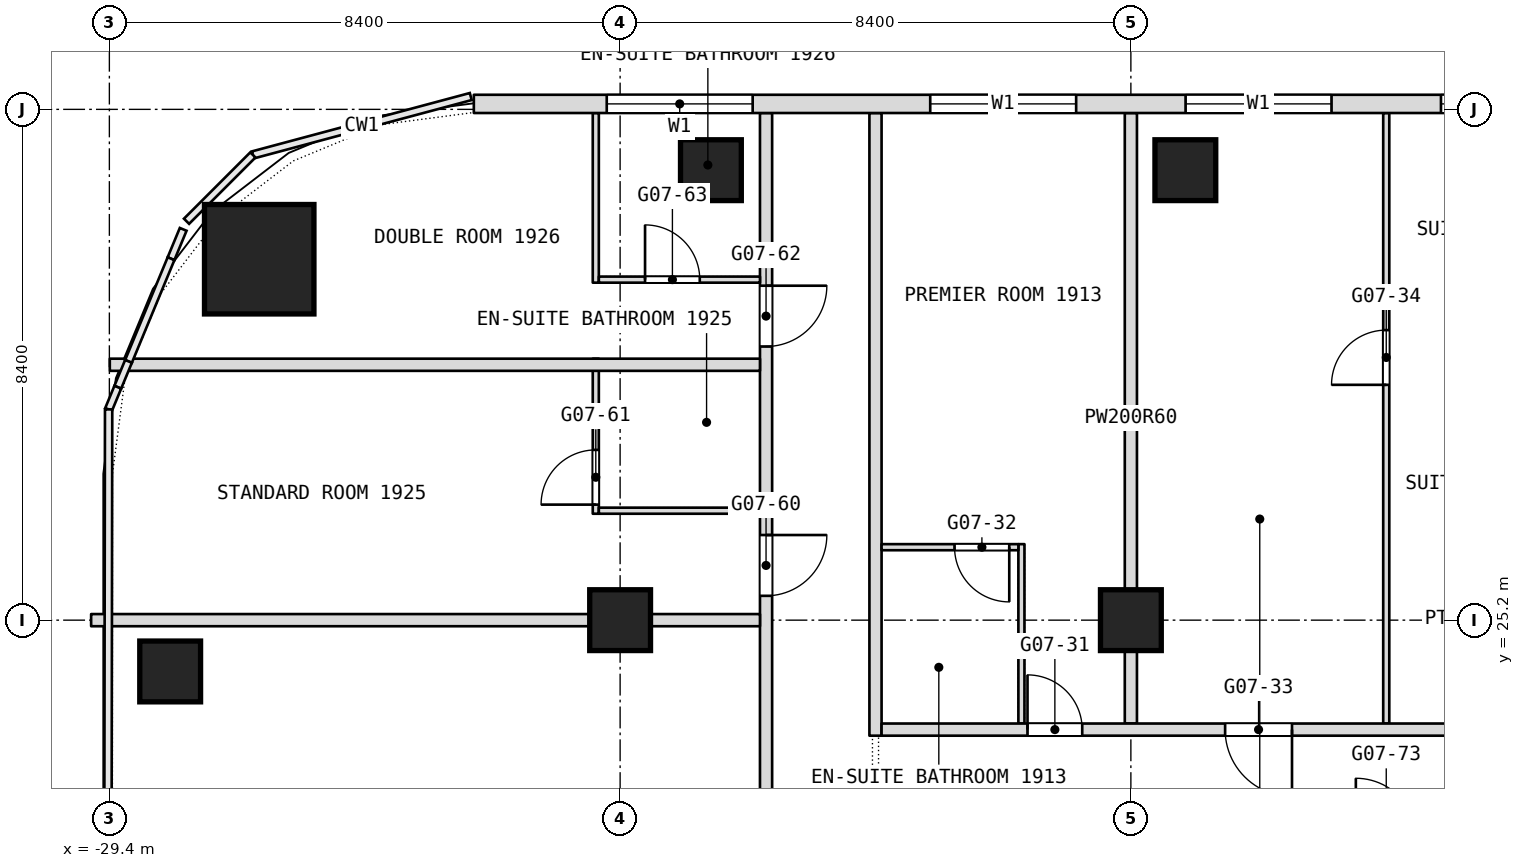
"""IFC4 building model, lengths in metres.
Left out: names, types, materials, properties, quantities, classifications, styles, units other than length and angle.
Written with IfcOpenShell. Run it as: python <this file> out.ifc"""

import sys

from ifc_helpers import new_model, si_unit, direction, frame, frame_2d, origin, origin_2d, place, context, subcontext, project, spatial, rectangle, extrude, element, fill, save


model = new_model("IFC4")
c1 = context("Model", 3, precision=1e-05, world=origin(), true_north=direction((0.0, 1.0)))
c2 = subcontext(c1, "Body", "Model", "MODEL_VIEW")
j1 = project(units=[si_unit("LENGTHUNIT", "METRE"), si_unit("PLANEANGLEUNIT", "RADIAN")], contexts=[c1])
p1 = place(None, origin())
s1 = spatial("IfcSite", under=j1, at=p1, CompositionType="ELEMENT")
p2 = place(p1, origin())
s2 = spatial("IfcBuilding", under=s1, at=p2, CompositionType="ELEMENT")
p3 = place(p2, frame((0.0, 0.0, 83.3)))
s3 = spatial("IfcBuildingStorey", under=s2, at=p3, CompositionType="ELEMENT", Elevation=83.3)
p4 = place(p3, frame((-26.936, 31.135, 0.0), z_axis=(0.0, 0.0, 1.0), x_axis=(1.0, 0.0, 0.0)))
e1 = element("IfcColumn", 1, at=p4, inside=s3, PredefinedType="COLUMN", context=c2, shape_type="SweptSolid", body=[
    extrude(rectangle(XDim=1.8, YDim=1.8, at=origin_2d()), origin(), (0.0, 0.0, 1.0), 3.6),
])
for number, where, z_axis, x_axis in (
    (2, (-21.0, 25.2, 0.0), (0.0, 0.0, 1.0), (1.0, 0.0, 0.0)),
    (3, (-12.6, 25.2, 0.0), (0.0, 0.0, 1.0), (1.0, 0.0, 0.0)),
    (4, (-28.4, 24.356, 0.0), (0.0, 0.0, 1.0), (1.0, 0.0, 0.0)),
    (5, (-19.507, 32.6, 0.0), (0.0, 0.0, 1.0), (1.0, 0.0, 0.0)),
    (6, (-11.704, 32.6, 0.0), (0.0, 0.0, 1.0), (1.0, 0.0, 0.0)),
):
    element("IfcColumn", number, at=place(p3, frame(where, z_axis=z_axis, x_axis=x_axis)), inside=s3, PredefinedType="COLUMN", context=c2, shape_type="SweptSolid", body=[
        extrude(rectangle(XDim=1.0, YDim=1.0, at=origin_2d()), origin(), (0.0, 0.0, 1.0), 3.6),
    ])
p5 = place(p3, frame((-8.4, 23.5, 0.0), z_axis=(0.0, 0.0, 1.0), x_axis=(0.0, 1.0, 0.0)))
e7 = element("IfcWall", 7, at=p5, inside=s3, PredefinedType="PARTITIONING", context=c2, shape_type="SweptSolid", body=[
    extrude(rectangle(XDim=10.04, YDim=0.1, at=frame_2d((5.02, 0.0))), origin(), (0.0, 0.0, 1.0), 3.3),
])
p6 = place(p5, frame((5.57, 0.0, 0.0)))
e8 = element("IfcOpeningElement", 8, at=p6, cuts=e7, PredefinedType="OPENING", context=c2, shape_type="SweptSolid", body=[
    extrude(rectangle(XDim=0.9, YDim=2.1, at=frame_2d((0.45, 1.05))), frame((0.0, 0.05, 0.0), z_axis=(0.0, -1.0, 0.0), x_axis=(1.0, 0.0, 0.0)), (0.0, 0.0, 1.0), 0.1),
])
p7 = place(p3, frame((-12.6, 23.5, 0.0), z_axis=(0.0, 0.0, 1.0), x_axis=(0.0, 1.0, 0.0)))
e9 = element("IfcWall", 9, at=p7, inside=s3, PredefinedType="PARTITIONING", context=c2, shape_type="SweptSolid", body=[
    extrude(rectangle(XDim=10.04, YDim=0.2, at=frame_2d((5.02, 0.0))), origin(), (0.0, 0.0, 1.0), 3.3),
])
p8 = place(p3, frame((-14.4, 23.5, 0.0), z_axis=(0.0, 0.0, 1.0), x_axis=(0.0, 1.0, 0.0)))
e10 = element("IfcWall", 10, at=p8, inside=s3, PredefinedType="PARTITIONING", context=c2, shape_type="SweptSolid", body=[
    extrude(rectangle(XDim=2.95, YDim=0.1, at=frame_2d((1.475, 0.0))), origin(), (0.0, 0.0, 1.0), 3.3),
])
p9 = place(p3, frame((-16.8, 23.3, 0.0), z_axis=(0.0, 0.0, 1.0), x_axis=(0.0, 1.0, 0.0)))
e11 = element("IfcWall", 11, at=p9, inside=s3, PredefinedType="PARTITIONING", context=c2, shape_type="SweptSolid", body=[
    extrude(rectangle(XDim=10.24, YDim=0.2, at=frame_2d((5.12, 0.0))), origin(), (0.0, 0.0, 1.0), 3.3),
])
p10 = place(p3, frame((-18.6, 18.5, 0.0), z_axis=(0.0, 0.0, 1.0), x_axis=(0.0, 1.0, 0.0)))
e12 = element("IfcWall", 12, at=p10, inside=s3, PredefinedType="PARTITIONING", context=c2, shape_type="SweptSolid", body=[
    extrude(rectangle(XDim=15.04, YDim=0.2, at=frame_2d((7.52, 0.0))), origin(), (0.0, 0.0, 1.0), 3.3),
])
p11 = place(p10, frame((1.6, 0.0, 0.0)))
e13 = element("IfcOpeningElement", 13, at=p11, cuts=e12, PredefinedType="OPENING", context=c2, shape_type="SweptSolid", body=[
    extrude(rectangle(XDim=1.8, YDim=2.1, at=frame_2d((0.9, 1.05))), frame((0.0, 0.1, 0.0), z_axis=(0.0, -1.0, 0.0), x_axis=(1.0, 0.0, 0.0)), (0.0, 0.0, 1.0), 0.2),
])
p12 = place(p10, frame((7.1, 0.0, 0.0)))
e14 = element("IfcOpeningElement", 14, at=p12, cuts=e12, PredefinedType="OPENING", context=c2, shape_type="SweptSolid", body=[
    extrude(rectangle(XDim=1.0, YDim=2.1, at=frame_2d((0.5, 1.05))), frame((0.0, 0.1, 0.0), z_axis=(0.0, -1.0, 0.0), x_axis=(1.0, 0.0, 0.0)), (0.0, 0.0, 1.0), 0.2),
])
p13 = place(p10, frame((11.2, 0.0, 0.0)))
e15 = element("IfcOpeningElement", 15, at=p13, cuts=e12, PredefinedType="OPENING", context=c2, shape_type="SweptSolid", body=[
    extrude(rectangle(XDim=1.0, YDim=2.1, at=frame_2d((0.5, 1.05))), frame((0.0, 0.1, 0.0), z_axis=(0.0, -1.0, 0.0), x_axis=(1.0, 0.0, 0.0)), (0.0, 0.0, 1.0), 0.2),
])
p14 = place(p3, frame((-21.4, 26.95, 0.0), z_axis=(0.0, 0.0, 1.0), x_axis=(0.0, 1.0, 0.0)))
e16 = element("IfcWall", 16, at=p14, inside=s3, PredefinedType="PARTITIONING", context=c2, shape_type="SweptSolid", body=[
    extrude(rectangle(XDim=2.55, YDim=0.1, at=frame_2d((1.275, 0.0))), origin(), (0.0, 0.0, 1.0), 3.3),
])
p15 = place(p14, frame((0.15, 0.0, 0.0)))
e17 = element("IfcOpeningElement", 17, at=p15, cuts=e16, PredefinedType="OPENING", context=c2, shape_type="SweptSolid", body=[
    extrude(rectangle(XDim=0.9, YDim=2.1, at=frame_2d((0.45, 1.05))), frame((0.0, 0.05, 0.0), z_axis=(0.0, -1.0, 0.0), x_axis=(1.0, 0.0, 0.0)), (0.0, 0.0, 1.0), 0.1),
])
p16 = place(p3, frame((-21.4, 30.75, 0.0), z_axis=(0.0, 0.0, 1.0), x_axis=(0.0, 1.0, 0.0)))
e18 = element("IfcWall", 18, at=p16, inside=s3, PredefinedType="PARTITIONING", context=c2, shape_type="SweptSolid", body=[
    extrude(rectangle(XDim=2.79, YDim=0.1, at=frame_2d((1.395, 0.0))), origin(), (0.0, 0.0, 1.0), 3.3),
])
p17 = place(p3, frame((-16.7, 23.4, 0.0), z_axis=(0.0, 0.0, 1.0), x_axis=(1.0, 0.0, 0.0)))
e19 = element("IfcWall", 19, at=p17, inside=s3, PredefinedType="PARTITIONING", context=c2, shape_type="SweptSolid", body=[
    extrude(rectangle(XDim=23.4, YDim=0.2, at=frame_2d((11.7, 0.0))), origin(), (0.0, 0.0, 1.0), 3.3),
])
p18 = place(p17, frame((2.4, 0.0, 0.0)))
e20 = element("IfcOpeningElement", 20, at=p18, cuts=e19, PredefinedType="OPENING", context=c2, shape_type="SweptSolid", body=[
    extrude(rectangle(XDim=0.9, YDim=2.1, at=frame_2d((0.45, 1.05))), frame((0.0, 0.1, 0.0), z_axis=(0.0, -1.0, 0.0), x_axis=(1.0, 0.0, 0.0)), (0.0, 0.0, 1.0), 0.2),
])
p19 = place(p17, frame((5.65, 0.0, 0.0)))
e21 = element("IfcOpeningElement", 21, at=p19, cuts=e19, PredefinedType="OPENING", context=c2, shape_type="SweptSolid", body=[
    extrude(rectangle(XDim=1.1, YDim=2.1, at=frame_2d((0.55, 1.05))), frame((0.0, 0.1, 0.0), z_axis=(0.0, -1.0, 0.0), x_axis=(1.0, 0.0, 0.0)), (0.0, 0.0, 1.0), 0.2),
])
p20 = place(p17, frame((15.3, 0.0, 0.0)))
e22 = element("IfcOpeningElement", 22, at=p20, cuts=e19, PredefinedType="OPENING", context=c2, shape_type="SweptSolid", body=[
    extrude(rectangle(XDim=1.0, YDim=2.1, at=frame_2d((0.5, 1.05))), frame((0.0, 0.1, 0.0), z_axis=(0.0, -1.0, 0.0), x_axis=(1.0, 0.0, 0.0)), (0.0, 0.0, 1.0), 0.2),
])
p21 = place(p17, frame((17.1, 0.0, 0.0)))
e23 = element("IfcOpeningElement", 23, at=p21, cuts=e19, PredefinedType="OPENING", context=c2, shape_type="SweptSolid", body=[
    extrude(rectangle(XDim=1.0, YDim=2.1, at=frame_2d((0.5, 1.05))), frame((0.0, 0.1, 0.0), z_axis=(0.0, -1.0, 0.0), x_axis=(1.0, 0.0, 0.0)), (0.0, 0.0, 1.0), 0.2),
])
p22 = place(p3, frame((-29.7, 25.2, 0.0), z_axis=(0.0, 0.0, 1.0), x_axis=(1.0, 0.0, 0.0)))
e24 = element("IfcWall", 24, at=p22, inside=s3, PredefinedType="PARTITIONING", context=c2, shape_type="SweptSolid", body=[
    extrude(rectangle(XDim=11.0, YDim=0.2, at=frame_2d((5.5, 0.0))), origin(), (0.0, 0.0, 1.0), 2.8),
])
p23 = place(p3, frame((-16.7, 26.4, 0.0), z_axis=(0.0, 0.0, 1.0), x_axis=(1.0, 0.0, 0.0)))
e25 = element("IfcWall", 25, at=p23, inside=s3, PredefinedType="PARTITIONING", context=c2, shape_type="SweptSolid", body=[
    extrude(rectangle(XDim=2.25, YDim=0.1, at=frame_2d((1.125, 0.0))), origin(), (0.0, 0.0, 1.0), 3.3),
])
p24 = place(p23, frame((1.2, 0.0, 0.0)))
e26 = element("IfcOpeningElement", 26, at=p24, cuts=e25, PredefinedType="OPENING", context=c2, shape_type="SweptSolid", body=[
    extrude(rectangle(XDim=0.9, YDim=2.1, at=frame_2d((0.45, 1.05))), frame((0.0, 0.05, 0.0), z_axis=(0.0, -1.0, 0.0), x_axis=(1.0, 0.0, 0.0)), (0.0, 0.0, 1.0), 0.1),
])
p25 = place(p3, frame((-21.35, 27.0, 0.0), z_axis=(0.0, 0.0, 1.0), x_axis=(1.0, 0.0, 0.0)))
e27 = element("IfcWall", 27, at=p25, inside=s3, PredefinedType="PARTITIONING", context=c2, shape_type="SweptSolid", body=[
    extrude(rectangle(XDim=2.65, YDim=0.1, at=frame_2d((1.325, 0.0))), origin(), (0.0, 0.0, 1.0), 3.3),
])
p26 = place(p3, frame((-29.393, 29.4, 0.0), z_axis=(0.0, 0.0, 1.0), x_axis=(1.0, 0.0, 0.0)))
e28 = element("IfcWall", 28, at=p26, inside=s3, PredefinedType="PARTITIONING", context=c2, shape_type="SweptSolid", body=[
    extrude(rectangle(XDim=10.693, YDim=0.2, at=frame_2d((5.347, 0.0))), origin(), (0.0, 0.0, 1.0), 3.3),
])
p27 = place(p3, frame((-21.35, 30.8, 0.0), z_axis=(0.0, 0.0, 1.0), x_axis=(1.0, 0.0, 0.0)))
e29 = element("IfcWall", 29, at=p27, inside=s3, PredefinedType="PARTITIONING", context=c2, shape_type="SweptSolid", body=[
    extrude(rectangle(XDim=2.65, YDim=0.1, at=frame_2d((1.325, 0.0))), origin(), (0.0, 0.0, 1.0), 3.3),
])
p28 = place(p27, frame((0.76, 0.0, 0.0)))
e30 = element("IfcOpeningElement", 30, at=p28, cuts=e29, PredefinedType="OPENING", context=c2, shape_type="SweptSolid", body=[
    extrude(rectangle(XDim=0.9, YDim=2.1, at=frame_2d((0.45, 1.05))), frame((0.0, 0.05, 0.0), z_axis=(0.0, -1.0, 0.0), x_axis=(1.0, 0.0, 0.0)), (0.0, 0.0, 1.0), 0.1),
])
p29 = place(p3, frame((23.406, 33.69, 0.0), z_axis=(0.0, 0.0, 1.0), x_axis=(-1.0, 0.0, 0.0)))
e31 = element("IfcWall", 31, at=p29, inside=s3, PredefinedType="NOTDEFINED", context=c2, shape_type="SweptSolid", body=[
    extrude(rectangle(XDim=46.812, YDim=0.3, at=frame_2d((23.406, 0.0))), origin(), (0.0, 0.0, 1.0), 3.6),
])
p30 = place(p29, frame((2.186, 0.0, 0.9)))
e32 = element("IfcOpeningElement", 32, at=p30, cuts=e31, PredefinedType="OPENING", context=c2, shape_type="SweptSolid", body=[
    extrude(rectangle(XDim=2.4, YDim=2.1, at=frame_2d((1.2, 1.05))), frame((0.0, 0.15, 0.0), z_axis=(0.0, -1.0, 0.0), x_axis=(1.0, 0.0, 0.0)), (0.0, 0.0, 1.0), 0.3),
])
p31 = place(p29, frame((7.506, 0.0, 0.9)))
e33 = element("IfcOpeningElement", 33, at=p31, cuts=e31, PredefinedType="OPENING", context=c2, shape_type="SweptSolid", body=[
    extrude(rectangle(XDim=2.4, YDim=2.1, at=frame_2d((1.2, 1.05))), frame((0.0, 0.15, 0.0), z_axis=(0.0, -1.0, 0.0), x_axis=(1.0, 0.0, 0.0)), (0.0, 0.0, 1.0), 0.3),
])
p32 = place(p29, frame((11.706, 0.0, 0.9)))
e34 = element("IfcOpeningElement", 34, at=p32, cuts=e31, PredefinedType="OPENING", context=c2, shape_type="SweptSolid", body=[
    extrude(rectangle(XDim=2.4, YDim=2.1, at=frame_2d((1.2, 1.05))), frame((0.0, 0.15, 0.0), z_axis=(0.0, -1.0, 0.0), x_axis=(1.0, 0.0, 0.0)), (0.0, 0.0, 1.0), 0.3),
])
p33 = place(p29, frame((15.906, 0.0, 0.9)))
e35 = element("IfcOpeningElement", 35, at=p33, cuts=e31, PredefinedType="OPENING", context=c2, shape_type="SweptSolid", body=[
    extrude(rectangle(XDim=2.4, YDim=2.1, at=frame_2d((1.2, 1.05))), frame((0.0, 0.15, 0.0), z_axis=(0.0, -1.0, 0.0), x_axis=(1.0, 0.0, 0.0)), (0.0, 0.0, 1.0), 0.3),
])
p34 = place(p29, frame((20.106, 0.0, 0.9)))
e36 = element("IfcOpeningElement", 36, at=p34, cuts=e31, PredefinedType="OPENING", context=c2, shape_type="SweptSolid", body=[
    extrude(rectangle(XDim=2.4, YDim=2.1, at=frame_2d((1.2, 1.05))), frame((0.0, 0.15, 0.0), z_axis=(0.0, -1.0, 0.0), x_axis=(1.0, 0.0, 0.0)), (0.0, 0.0, 1.0), 0.3),
])
p35 = place(p29, frame((24.306, 0.0, 0.9)))
e37 = element("IfcOpeningElement", 37, at=p35, cuts=e31, PredefinedType="OPENING", context=c2, shape_type="SweptSolid", body=[
    extrude(rectangle(XDim=2.4, YDim=2.1, at=frame_2d((1.2, 1.05))), frame((0.0, 0.15, 0.0), z_axis=(0.0, -1.0, 0.0), x_axis=(1.0, 0.0, 0.0)), (0.0, 0.0, 1.0), 0.3),
])
p36 = place(p29, frame((28.506, 0.0, 0.9)))
e38 = element("IfcOpeningElement", 38, at=p36, cuts=e31, PredefinedType="OPENING", context=c2, shape_type="SweptSolid", body=[
    extrude(rectangle(XDim=2.4, YDim=2.1, at=frame_2d((1.2, 1.05))), frame((0.0, 0.15, 0.0), z_axis=(0.0, -1.0, 0.0), x_axis=(1.0, 0.0, 0.0)), (0.0, 0.0, 1.0), 0.3),
])
p37 = place(p29, frame((32.706, 0.0, 0.9)))
e39 = element("IfcOpeningElement", 39, at=p37, cuts=e31, PredefinedType="OPENING", context=c2, shape_type="SweptSolid", body=[
    extrude(rectangle(XDim=2.4, YDim=2.1, at=frame_2d((1.2, 1.05))), frame((0.0, 0.15, 0.0), z_axis=(0.0, -1.0, 0.0), x_axis=(1.0, 0.0, 0.0)), (0.0, 0.0, 1.0), 0.3),
])
p38 = place(p29, frame((36.906, 0.0, 0.9)))
e40 = element("IfcOpeningElement", 40, at=p38, cuts=e31, PredefinedType="OPENING", context=c2, shape_type="SweptSolid", body=[
    extrude(rectangle(XDim=2.4, YDim=2.1, at=frame_2d((1.2, 1.05))), frame((0.0, 0.15, 0.0), z_axis=(0.0, -1.0, 0.0), x_axis=(1.0, 0.0, 0.0)), (0.0, 0.0, 1.0), 0.3),
])
p39 = place(p29, frame((42.226, 0.0, 0.9)))
e41 = element("IfcOpeningElement", 41, at=p39, cuts=e31, PredefinedType="OPENING", context=c2, shape_type="SweptSolid", body=[
    extrude(rectangle(XDim=2.4, YDim=2.1, at=frame_2d((1.2, 1.05))), frame((0.0, 0.15, 0.0), z_axis=(0.0, -1.0, 0.0), x_axis=(1.0, 0.0, 0.0)), (0.0, 0.0, 1.0), 0.3),
])
p40 = place(p6, origin())
e42 = element("IfcDoor", 42, at=p40, inside=s3, OperationType="SINGLE_SWING_RIGHT", PredefinedType="DOOR", context=c2, shape_type="SweptSolid", body=[
    extrude(rectangle(XDim=0.9, YDim=2.1, at=frame_2d((0.45, 1.05))), frame((0.0, 0.025, 0.0), z_axis=(0.0, -1.0, 0.0), x_axis=(1.0, 0.0, 0.0)), (0.0, 0.0, 1.0), 0.05),
])
fill(e8, e42)
p41 = place(p12, origin())
e43 = element("IfcDoor", 43, at=p41, inside=s3, OperationType="SINGLE_SWING_LEFT", PredefinedType="DOOR", context=c2, shape_type="SweptSolid", body=[
    extrude(rectangle(XDim=1.0, YDim=2.1, at=frame_2d((0.5, 1.05))), frame((0.0, 0.025, 0.0), z_axis=(0.0, -1.0, 0.0), x_axis=(1.0, 0.0, 0.0)), (0.0, 0.0, 1.0), 0.05),
])
fill(e14, e43)
p42 = place(p13, origin())
e44 = element("IfcDoor", 44, at=p42, inside=s3, OperationType="SINGLE_SWING_RIGHT", PredefinedType="DOOR", context=c2, shape_type="SweptSolid", body=[
    extrude(rectangle(XDim=1.0, YDim=2.1, at=frame_2d((0.5, 1.05))), frame((0.0, 0.025, 0.0), z_axis=(0.0, -1.0, 0.0), x_axis=(1.0, 0.0, 0.0)), (0.0, 0.0, 1.0), 0.05),
])
fill(e15, e44)
p43 = place(p15, origin())
e45 = element("IfcDoor", 45, at=p43, inside=s3, OperationType="SINGLE_SWING_RIGHT", PredefinedType="DOOR", context=c2, shape_type="SweptSolid", body=[
    extrude(rectangle(XDim=0.9, YDim=2.1, at=frame_2d((0.45, 1.05))), frame((0.0, 0.025, 0.0), z_axis=(0.0, -1.0, 0.0), x_axis=(1.0, 0.0, 0.0)), (0.0, 0.0, 1.0), 0.05),
])
fill(e17, e45)
p44 = place(p18, origin())
e46 = element("IfcDoor", 46, at=p44, inside=s3, OperationType="SINGLE_SWING_LEFT", PredefinedType="DOOR", context=c2, shape_type="SweptSolid", body=[
    extrude(rectangle(XDim=0.9, YDim=2.1, at=frame_2d((0.45, 1.05))), frame((0.0, 0.025, 0.0), z_axis=(0.0, -1.0, 0.0), x_axis=(1.0, 0.0, 0.0)), (0.0, 0.0, 1.0), 0.05),
])
fill(e20, e46)
p45 = place(p19, origin())
e47 = element("IfcDoor", 47, at=p45, inside=s3, OperationType="SINGLE_SWING_RIGHT", PredefinedType="DOOR", context=c2, shape_type="SweptSolid", body=[
    extrude(rectangle(XDim=1.1, YDim=2.1, at=frame_2d((0.55, 1.05))), frame((0.0, 0.025, 0.0), z_axis=(0.0, -1.0, 0.0), x_axis=(1.0, 0.0, 0.0)), (0.0, 0.0, 1.0), 0.05),
])
fill(e21, e47)
p46 = place(p24, origin())
e48 = element("IfcDoor", 48, at=p46, inside=s3, OperationType="SINGLE_SWING_LEFT", PredefinedType="DOOR", context=c2, shape_type="SweptSolid", body=[
    extrude(rectangle(XDim=0.9, YDim=2.1, at=frame_2d((0.45, 1.05))), frame((0.0, 0.025, 0.0), z_axis=(0.0, -1.0, 0.0), x_axis=(1.0, 0.0, 0.0)), (0.0, 0.0, 1.0), 0.05),
])
fill(e26, e48)
p47 = place(p28, origin())
e49 = element("IfcDoor", 49, at=p47, inside=s3, OperationType="SINGLE_SWING_LEFT", PredefinedType="DOOR", context=c2, shape_type="SweptSolid", body=[
    extrude(rectangle(XDim=0.9, YDim=2.1, at=frame_2d((0.45, 1.05))), frame((0.0, 0.025, 0.0), z_axis=(0.0, -1.0, 0.0), x_axis=(1.0, 0.0, 0.0)), (0.0, 0.0, 1.0), 0.05),
])
fill(e30, e49)
p48 = place(p36, origin())
e50 = element("IfcWindow", 50, at=p48, inside=s3, PartitioningType="SINGLE_PANEL", PredefinedType="WINDOW", context=c2, shape_type="SweptSolid", body=[
    extrude(rectangle(XDim=2.4, YDim=2.1, at=frame_2d((1.2, 1.05))), frame((0.0, 0.03, 0.0), z_axis=(0.0, -1.0, 0.0), x_axis=(1.0, 0.0, 0.0)), (0.0, 0.0, 1.0), 0.06),
])
fill(e38, e50)
p49 = place(p37, origin())
e51 = element("IfcWindow", 51, at=p49, inside=s3, PartitioningType="SINGLE_PANEL", PredefinedType="WINDOW", context=c2, shape_type="SweptSolid", body=[
    extrude(rectangle(XDim=2.4, YDim=2.1, at=frame_2d((1.2, 1.05))), frame((0.0, 0.03, 0.0), z_axis=(0.0, -1.0, 0.0), x_axis=(1.0, 0.0, 0.0)), (0.0, 0.0, 1.0), 0.06),
])
fill(e39, e51)
p50 = place(p38, origin())
e52 = element("IfcWindow", 52, at=p50, inside=s3, PartitioningType="SINGLE_PANEL", PredefinedType="WINDOW", context=c2, shape_type="SweptSolid", body=[
    extrude(rectangle(XDim=2.4, YDim=2.1, at=frame_2d((1.2, 1.05))), frame((0.0, 0.03, 0.0), z_axis=(0.0, -1.0, 0.0), x_axis=(1.0, 0.0, 0.0)), (0.0, 0.0, 1.0), 0.06),
])
fill(e40, e52)
p51 = place(p39, origin())
e53 = element("IfcWindow", 53, at=p51, inside=s3, PartitioningType="SINGLE_PANEL", PredefinedType="WINDOW", context=c2, shape_type="SweptSolid", body=[
    extrude(rectangle(XDim=2.4, YDim=2.1, at=frame_2d((1.2, 1.05))), frame((0.0, 0.03, 0.0), z_axis=(0.0, -1.0, 0.0), x_axis=(1.0, 0.0, 0.0)), (0.0, 0.0, 1.0), 0.06),
])
fill(e41, e53)
save(model, sys.argv[1])
